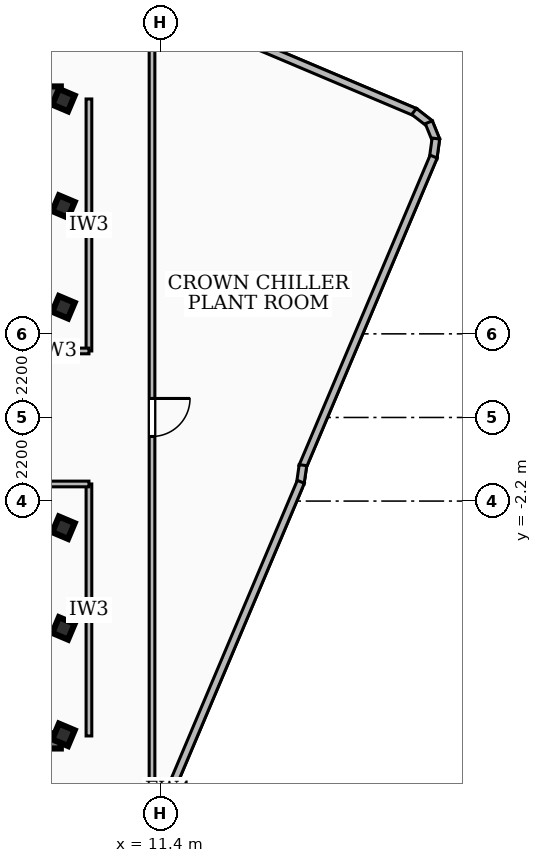
"""IFC4 building model, lengths in metres.
Left out: names, types, materials, properties, quantities, classifications, styles, units other than length and angle.
Written with IfcOpenShell. Run it as: python <this file> out.ifc"""

import sys

from ifc_helpers import new_model, si_unit, direction, frame, frame_2d, origin, origin_2d, place, context, subcontext, project, spatial, rectangle, hollow_rectangle, extrude, element, fill, save


model = new_model("IFC4")
c1 = context("Model", 3, precision=1e-05, world=origin(), true_north=direction((0.0, 1.0)))
c2 = subcontext(c1, "Body", "Model", "MODEL_VIEW")
j1 = project(units=[si_unit("LENGTHUNIT", "METRE"), si_unit("PLANEANGLEUNIT", "RADIAN")], contexts=[c1])
p1 = place(None, origin())
s1 = spatial("IfcSite", under=j1, at=p1, CompositionType="ELEMENT")
p2 = place(p1, origin())
s2 = spatial("IfcBuilding", under=s1, at=p2, CompositionType="ELEMENT")
p3 = place(p2, frame((0.0, 0.0, 301.68)))
s3 = spatial("IfcBuildingStorey", under=s2, at=p3, CompositionType="ELEMENT", Elevation=301.68)
for number, where, z_axis, x_axis in (
    (1, (-8.78, 8.51, 0.0), (0.0, 0.0, 1.0), (1.0, 0.0, 0.0)),
    (2, (8.78, -8.51, 0.0), (0.0, 0.0, 1.0), (-1.0, 0.0, 0.0)),
):
    element("IfcWall", number, at=place(p3, frame(where, z_axis=z_axis, x_axis=x_axis)), inside=s3, PredefinedType="SHEAR", context=c2, shape_type="SweptSolid", body=[
        extrude(rectangle(XDim=17.56, YDim=0.4, at=frame_2d((8.78, 0.0))), origin(), (0.0, 0.0, 1.0), 3.89),
    ])
for number, where, z_axis, x_axis in (
    (3, (8.85, -5.55, 0.0), (0.0, 0.0, 1.0), (0.389, 0.921, 0.0)),
    (4, (8.85, -2.9, 0.0), (0.0, 0.0, 1.0), (0.389, 0.921, 0.0)),
    (5, (8.85, 2.9, 0.0), (0.0, 0.0, 1.0), (0.389, 0.921, 0.0)),
    (6, (8.85, 5.55, 0.0), (0.0, 0.0, 1.0), (0.389, 0.921, 0.0)),
    (7, (8.85, -8.35, 0.0), (0.0, 0.0, 1.0), (0.389, 0.921, 0.0)),
    (8, (8.85, 8.35, 0.0), (0.0, 0.0, 1.0), (0.389, 0.921, 0.0)),
):
    element("IfcColumn", number, at=place(p3, frame(where, z_axis=z_axis, x_axis=x_axis)), inside=s3, PredefinedType="COLUMN", context=c2, shape_type="SweptSolid", body=[
        extrude(hollow_rectangle(XDim=0.45, YDim=0.45, WallThickness=0.022, at=origin_2d()), origin(), (0.0, 0.0, 1.0), 4.14),
    ])
p4 = place(p3, frame((11.756, -9.608, 0.0), z_axis=(0.0, 0.0, 1.0), x_axis=(-0.61252495827, -0.79045124802, 0.0)))
e9 = element("IfcWall", 9, at=p4, inside=s3, PredefinedType="SOLIDWALL", context=c2, shape_type="SweptSolid", body=[
    extrude(rectangle(XDim=0.49, YDim=0.2, at=frame_2d((0.245, 0.0))), origin(), (0.0, 0.0, 1.0), 3.89),
])
p5 = place(p3, frame((9.7, 11.587, 0.0), z_axis=(0.0, 0.0, 1.0), x_axis=(0.921047594323, -0.389450034011, 0.0)))
e10 = element("IfcWall", 10, at=p5, inside=s3, PredefinedType="SOLIDWALL", context=c2, shape_type="SweptSolid", body=[
    extrude(rectangle(XDim=9.141, YDim=0.2, at=frame_2d((4.57, 0.0))), origin(), (0.0, 0.0, 1.0), 3.89),
])
p6 = place(p3, frame((18.076, 8.052, 0.0), z_axis=(0.0, 0.0, 1.0), x_axis=(0.789876089069, -0.613266470563, 0.0)))
e11 = element("IfcWall", 11, at=p6, inside=s3, PredefinedType="SOLIDWALL", context=c2, shape_type="SweptSolid", body=[
    extrude(rectangle(XDim=0.527, YDim=0.2, at=frame_2d((0.263, 0.0))), origin(), (0.0, 0.0, 1.0), 3.89),
])
p7 = place(p3, frame((18.463, 7.767, 0.0), z_axis=(0.0, 0.0, 1.0), x_axis=(0.375892621934, -0.926663227271, 0.0)))
e12 = element("IfcWall", 12, at=p7, inside=s3, PredefinedType="SOLIDWALL", context=c2, shape_type="SweptSolid", body=[
    extrude(rectangle(XDim=0.514, YDim=0.2, at=frame_2d((0.257, 0.0))), origin(), (0.0, 0.0, 1.0), 3.89),
])
p8 = place(p3, frame((18.65, 7.339, 0.0), z_axis=(0.0, 0.0, 1.0), x_axis=(-0.136371462064, -0.99065777357, 0.0)))
e13 = element("IfcWall", 13, at=p8, inside=s3, PredefinedType="SOLIDWALL", context=c2, shape_type="SweptSolid", body=[
    extrude(rectangle(XDim=0.528, YDim=0.2, at=frame_2d((0.264, 0.0))), origin(), (0.0, 0.0, 1.0), 3.89),
])
p9 = place(p3, frame((18.591, 6.864, 0.0), z_axis=(0.0, 0.0, 1.0), x_axis=(-0.389435189284, -0.921053871035, 0.0)))
e14 = element("IfcWall", 14, at=p9, inside=s3, PredefinedType="SOLIDWALL", context=c2, shape_type="SweptSolid", body=[
    extrude(rectangle(XDim=8.867, YDim=0.2, at=frame_2d((4.434, 0.0))), origin(), (0.0, 0.0, 1.0), 3.89),
])
p10 = place(p3, frame((15.152, -1.255, 0.0), z_axis=(0.0, 0.0, 1.0), x_axis=(-0.142673990232, -0.989769737116, 0.0)))
e15 = element("IfcWall", 15, at=p10, inside=s3, PredefinedType="SOLIDWALL", context=c2, shape_type="SweptSolid", body=[
    extrude(rectangle(XDim=0.491, YDim=0.2, at=frame_2d((0.246, 0.0))), origin(), (0.0, 0.0, 1.0), 3.89),
])
p11 = place(p3, frame((15.096, -1.693, 0.0), z_axis=(0.0, 0.0, 1.0), x_axis=(-0.389467605067, -0.92104016449, 0.0)))
e16 = element("IfcWall", 16, at=p11, inside=s3, PredefinedType="SOLIDWALL", context=c2, shape_type="SweptSolid", body=[
    extrude(rectangle(XDim=8.64, YDim=0.2, at=frame_2d((4.32, 0.0))), origin(), (0.0, 0.0, 1.0), 3.89),
])
p12 = place(p3, frame((9.52, 1.75, 0.0), z_axis=(0.0, 0.0, 1.0), x_axis=(0.0, 1.0, 0.0)))
e17 = element("IfcWall", 17, at=p12, inside=s3, PredefinedType="PARTITIONING", context=c2, shape_type="SweptSolid", body=[
    extrude(rectangle(XDim=6.63, YDim=0.15, at=frame_2d((3.315, 0.0))), origin(), (0.0, 0.0, 1.0), 3.89),
])
p13 = place(p3, frame((7.85, 1.75, 0.0), z_axis=(0.0, 0.0, 1.0), x_axis=(1.0, 0.0, 0.0)))
e18 = element("IfcWall", 18, at=p13, inside=s3, PredefinedType="PARTITIONING", context=c2, shape_type="SweptSolid", body=[
    extrude(rectangle(XDim=1.67, YDim=0.15, at=frame_2d((0.835, 0.0))), origin(), (0.0, 0.0, 1.0), 3.27),
])
p14 = place(p3, frame((9.52, -8.38, 0.0), z_axis=(0.0, 0.0, 1.0), x_axis=(0.0, 1.0, 0.0)))
e19 = element("IfcWall", 19, at=p14, inside=s3, PredefinedType="PARTITIONING", context=c2, shape_type="SweptSolid", body=[
    extrude(rectangle(XDim=6.63, YDim=0.15, at=frame_2d((3.315, 0.0))), origin(), (0.0, 0.0, 1.0), 3.26),
])
p15 = place(p3, frame((7.85, -1.75, 0.0), z_axis=(0.0, 0.0, 1.0), x_axis=(1.0, 0.0, 0.0)))
e20 = element("IfcWall", 20, at=p15, inside=s3, PredefinedType="PARTITIONING", context=c2, shape_type="SweptSolid", body=[
    extrude(rectangle(XDim=1.67, YDim=0.15, at=frame_2d((0.835, 0.0))), origin(), (0.0, 0.0, 1.0), 3.27),
])
p16 = place(p3, frame((11.18, 10.891, 0.0), z_axis=(0.0, 0.0, 1.0), x_axis=(0.0, -1.0, 0.0)))
e21 = element("IfcWall", 21, at=p16, inside=s3, PredefinedType="PARTITIONING", context=c2, shape_type="SweptSolid", body=[
    extrude(rectangle(XDim=21.387, YDim=0.15, at=frame_2d((10.694, 0.0))), origin(), (0.0, 0.0, 1.0), 3.26),
])
p17 = place(p16, frame((10.391, 0.0, 0.0)))
e22 = element("IfcOpeningElement", 22, at=p17, cuts=e21, PredefinedType="OPENING", context=c2, shape_type="SweptSolid", body=[
    extrude(rectangle(XDim=1.0, YDim=2.1, at=frame_2d((0.5, 1.05))), frame((0.0, 0.085, 0.0), z_axis=(0.0, -1.0, 0.0), x_axis=(1.0, 0.0, 0.0)), (0.0, 0.0, 1.0), 0.17),
])
p18 = place(p17, origin())
e23 = element("IfcDoor", 23, at=p18, inside=s3, OperationType="SINGLE_SWING_LEFT", PredefinedType="DOOR", context=c2, shape_type="SweptSolid", body=[
    extrude(rectangle(XDim=1.0, YDim=2.1, at=frame_2d((0.5, 1.05))), frame((0.0, 0.025, 0.0), z_axis=(0.0, -1.0, 0.0), x_axis=(1.0, 0.0, 0.0)), (0.0, 0.0, 1.0), 0.05),
])
fill(e22, e23)
save(model, sys.argv[1])
